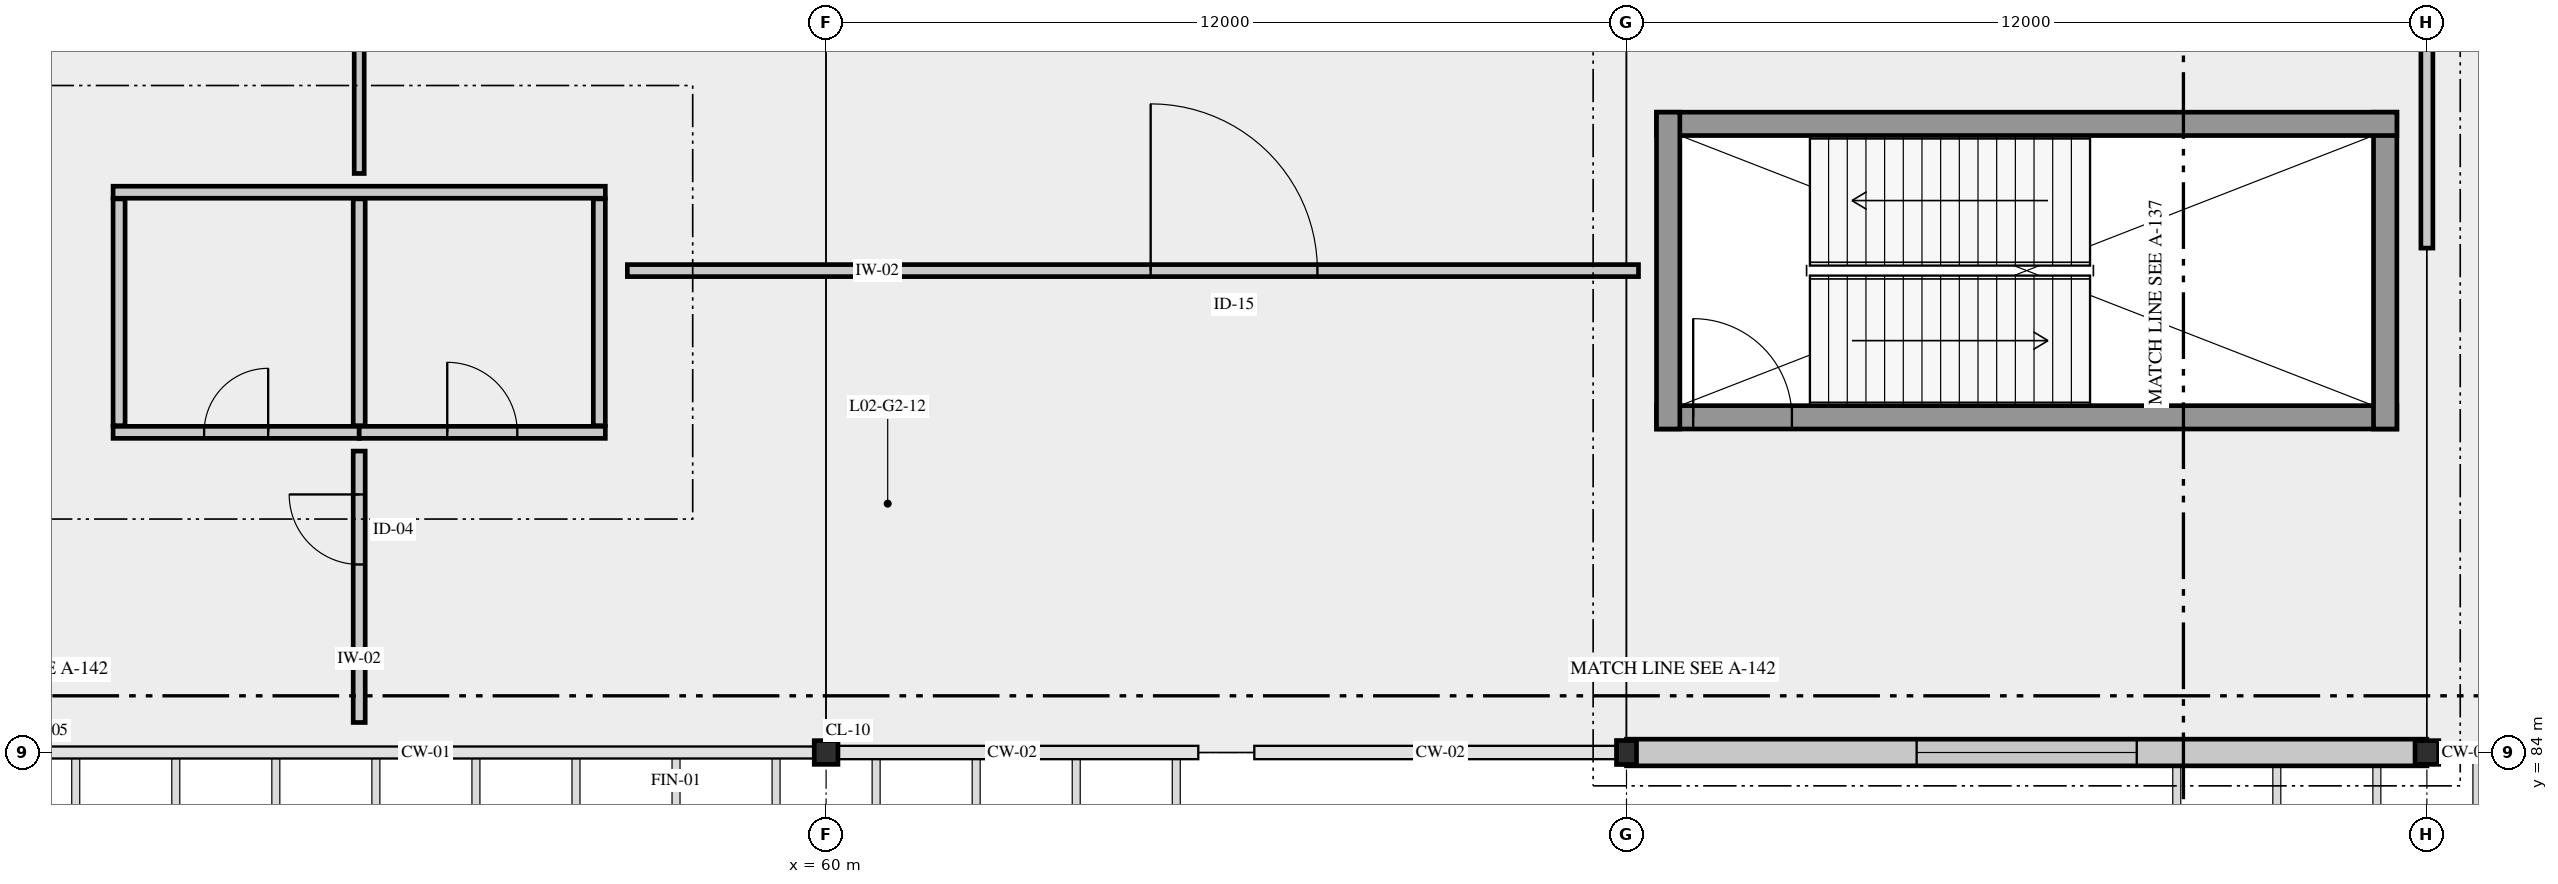
"""IFC4 building model, lengths in metres.
Left out: names, types, materials, properties, quantities, classifications, styles, units other than length and angle.
Written with IfcOpenShell. Run it as: python <this file> out.ifc"""

import sys

from ifc_helpers import new_model, si_unit, direction, frame, frame_2d, origin, origin_2d, place, context, subcontext, project, spatial, rectangle, hollow_circle, i_section, extrude, element, fill, save


model = new_model("IFC4")
c1 = context("Model", 3, precision=1e-05, world=origin(), true_north=direction((0.0, 1.0)))
c2 = subcontext(c1, "Body", "Model", "MODEL_VIEW")
j1 = project(units=[si_unit("LENGTHUNIT", "METRE"), si_unit("PLANEANGLEUNIT", "RADIAN")], contexts=[c1])
p1 = place(None, origin())
s1 = spatial("IfcSite", under=j1, at=p1, CompositionType="ELEMENT")
p2 = place(p1, origin())
s2 = spatial("IfcBuilding", under=s1, at=p2, CompositionType="ELEMENT")
p3 = place(p2, frame((0.0, 0.0, 10.8)))
s3 = spatial("IfcBuildingStorey", under=s2, at=p3, CompositionType="ELEMENT", Elevation=10.8)
p4 = place(p3, frame((60.0, 84.0, 0.0), z_axis=(0.0, 0.0, 1.0), x_axis=(1.0, 0.0, 0.0)))
e1 = element("IfcColumn", 1, at=p4, inside=s3, PredefinedType="COLUMN", context=c2, shape_type="SweptSolid", body=[
    extrude(hollow_circle(Radius=0.178, WallThickness=0.016, at=origin_2d()), origin(), (0.0, 0.0, 1.0), 6.0),
])
p5 = place(p3, frame((72.0, 84.0, 0.0), z_axis=(0.0, 0.0, 1.0), x_axis=(1.0, 0.0, 0.0)))
e2 = element("IfcColumn", 2, at=p5, inside=s3, PredefinedType="COLUMN", context=c2, shape_type="SweptSolid", body=[
    extrude(i_section(OverallWidth=0.3, OverallDepth=0.36, WebThickness=0.012, FlangeThickness=0.022, FilletRadius=0.027, at=origin_2d()), origin(), (0.0, 0.0, 1.0), 6.0),
])
p6 = place(p3, frame((84.0, 84.0, 0.0), z_axis=(0.0, 0.0, 1.0), x_axis=(1.0, 0.0, 0.0)))
e3 = element("IfcColumn", 3, at=p6, inside=s3, PredefinedType="COLUMN", context=c2, shape_type="SweptSolid", body=[
    extrude(hollow_circle(Radius=0.178, WallThickness=0.016, at=origin_2d()), origin(), (0.0, 0.0, 1.0), 6.0),
])
p7 = place(p3, frame((72.0, 84.0, 0.0), z_axis=(0.0, 0.0, 1.0), x_axis=(1.0, 0.0, 0.0)))
e4 = element("IfcWall", 4, at=p7, inside=s3, PredefinedType="SOLIDWALL", context=c2, shape_type="SweptSolid", body=[
    extrude(rectangle(XDim=12.0, YDim=0.4, at=frame_2d((6.0, 0.0))), origin(), (0.0, 0.0, 1.0), 5.11),
])
p8 = place(p7, frame((4.35, 0.0, 0.95)))
e5 = element("IfcOpeningElement", 5, at=p8, cuts=e4, PredefinedType="OPENING", context=c2, shape_type="SweptSolid", body=[
    extrude(rectangle(XDim=3.3, YDim=2.4, at=frame_2d((1.65, 1.2))), frame((0.0, 0.21, 0.0), z_axis=(0.0, -1.0, 0.0), x_axis=(1.0, 0.0, 0.0)), (0.0, 0.0, 1.0), 0.42),
])
p9 = place(p3, frame((72.45, 89.025, 0.0), z_axis=(0.0, 0.0, 1.0), x_axis=(1.0, 0.0, 0.0)))
e6 = element("IfcWall", 6, at=p9, inside=s3, PredefinedType="SHEAR", context=c2, shape_type="SweptSolid", body=[
    extrude(rectangle(XDim=11.1, YDim=0.35, at=frame_2d((5.55, 0.0))), origin(), (0.0, 0.0, 1.0), 5.69),
])
p10 = place(p9, frame((0.55, 0.0, 0.0)))
e7 = element("IfcOpeningElement", 7, at=p10, cuts=e6, PredefinedType="OPENING", context=c2, shape_type="SweptSolid", body=[
    extrude(rectangle(XDim=1.48, YDim=2.3, at=frame_2d((0.74, 1.15))), frame((0.0, 0.185, 0.0), z_axis=(0.0, -1.0, 0.0), x_axis=(1.0, 0.0, 0.0)), (0.0, 0.0, 1.0), 0.37),
])
p11 = place(p3, frame((83.375, 88.85, 0.0), z_axis=(0.0, 0.0, 1.0), x_axis=(0.0, 1.0, 0.0)))
e8 = element("IfcWall", 8, at=p11, inside=s3, PredefinedType="SHEAR", context=c2, shape_type="SweptSolid", body=[
    extrude(rectangle(XDim=4.75, YDim=0.35, at=frame_2d((2.375, 0.0))), origin(), (0.0, 0.0, 1.0), 5.69),
])
p12 = place(p3, frame((83.55, 93.425, 0.0), z_axis=(0.0, 0.0, 1.0), x_axis=(-1.0, 0.0, 0.0)))
e9 = element("IfcWall", 9, at=p12, inside=s3, PredefinedType="SHEAR", context=c2, shape_type="SweptSolid", body=[
    extrude(rectangle(XDim=11.1, YDim=0.35, at=frame_2d((5.55, 0.0))), origin(), (0.0, 0.0, 1.0), 5.69),
])
p13 = place(p3, frame((72.625, 93.6, 0.0), z_axis=(0.0, 0.0, 1.0), x_axis=(0.0, -1.0, 0.0)))
e10 = element("IfcWall", 10, at=p13, inside=s3, PredefinedType="SHEAR", context=c2, shape_type="SweptSolid", body=[
    extrude(rectangle(XDim=4.75, YDim=0.35, at=frame_2d((2.375, 0.0))), origin(), (0.0, 0.0, 1.0), 5.69),
])
p14 = place(p3, frame((49.31, 92.4, 0.0), z_axis=(0.0, 0.0, 1.0), x_axis=(1.0, 0.0, 0.0)))
e11 = element("IfcWall", 11, at=p14, inside=s3, PredefinedType="PARTITIONING", context=c2, shape_type="SweptSolid", body=[
    extrude(rectangle(XDim=7.38, YDim=0.18, at=frame_2d((3.69, 0.0))), origin(), (0.0, 0.0, 1.0), 5.27),
])
p15 = place(p3, frame((49.31, 88.8, 0.0), z_axis=(0.0, 0.0, 1.0), x_axis=(1.0, 0.0, 0.0)))
e12 = element("IfcWall", 12, at=p15, inside=s3, PredefinedType="PARTITIONING", context=c2, shape_type="SweptSolid", body=[
    extrude(rectangle(XDim=3.69, YDim=0.18, at=frame_2d((1.845, 0.0))), origin(), (0.0, 0.0, 1.0), 5.27),
])
p16 = place(p15, frame((1.365, 0.0, 0.0)))
e13 = element("IfcOpeningElement", 13, at=p16, cuts=e12, PredefinedType="OPENING", context=c2, shape_type="SweptSolid", body=[
    extrude(rectangle(XDim=0.96, YDim=2.15, at=frame_2d((0.48, 1.075))), frame((0.0, 0.1, 0.0), z_axis=(0.0, -1.0, 0.0), x_axis=(1.0, 0.0, 0.0)), (0.0, 0.0, 1.0), 0.2),
])
p17 = place(p3, frame((53.0, 88.8, 0.0), z_axis=(0.0, 0.0, 1.0), x_axis=(1.0, 0.0, 0.0)))
e14 = element("IfcWall", 14, at=p17, inside=s3, PredefinedType="PARTITIONING", context=c2, shape_type="SweptSolid", body=[
    extrude(rectangle(XDim=3.69, YDim=0.18, at=frame_2d((1.845, 0.0))), origin(), (0.0, 0.0, 1.0), 5.27),
])
p18 = place(p17, frame((1.32, 0.0, 0.0)))
e15 = element("IfcOpeningElement", 15, at=p18, cuts=e14, PredefinedType="OPENING", context=c2, shape_type="SweptSolid", body=[
    extrude(rectangle(XDim=1.05, YDim=2.2, at=frame_2d((0.525, 1.1))), frame((0.0, 0.1, 0.0), z_axis=(0.0, -1.0, 0.0), x_axis=(1.0, 0.0, 0.0)), (0.0, 0.0, 1.0), 0.2),
])
for number, where, z_axis, x_axis in (
    (16, (49.4, 88.9, 0.0), (0.0, 0.0, 1.0), (0.0, 1.0, 0.0)),
    (17, (56.6, 88.9, 0.0), (0.0, 0.0, 1.0), (0.0, 1.0, 0.0)),
    (18, (53.0, 88.9, 0.0), (0.0, 0.0, 1.0), (0.0, 1.0, 0.0)),
):
    element("IfcWall", number, at=place(p3, frame(where, z_axis=z_axis, x_axis=x_axis)), inside=s3, PredefinedType="PARTITIONING", context=c2, shape_type="SweptSolid", body=[
        extrude(rectangle(XDim=3.4, YDim=0.18, at=frame_2d((1.7, 0.0))), origin(), (0.0, 0.0, 1.0), 5.27),
    ])
p19 = place(p3, frame((53.0, 84.45, 0.0), z_axis=(0.0, 0.0, 1.0), x_axis=(0.0, 1.0, 0.0)))
e19 = element("IfcWall", 19, at=p19, inside=s3, PredefinedType="PARTITIONING", context=c2, shape_type="SweptSolid", body=[
    extrude(rectangle(XDim=4.069, YDim=0.18, at=frame_2d((2.035, 0.0))), origin(), (0.0, 0.0, 1.0), 5.27),
])
p20 = place(p19, frame((2.369, 0.0, 0.0)))
e20 = element("IfcOpeningElement", 20, at=p20, cuts=e19, PredefinedType="OPENING", context=c2, shape_type="SweptSolid", body=[
    extrude(rectangle(XDim=1.05, YDim=2.2, at=frame_2d((0.525, 1.1))), frame((0.0, 0.1, 0.0), z_axis=(0.0, -1.0, 0.0), x_axis=(1.0, 0.0, 0.0)), (0.0, 0.0, 1.0), 0.2),
])
p21 = place(p3, frame((53.0, 92.681, 0.0), z_axis=(0.0, 0.0, 1.0), x_axis=(0.0, 1.0, 0.0)))
e21 = element("IfcWall", 21, at=p21, inside=s3, PredefinedType="PARTITIONING", context=c2, shape_type="SweptSolid", body=[
    extrude(rectangle(XDim=26.869, YDim=0.15, at=frame_2d((13.435, 0.0))), origin(), (0.0, 0.0, 1.0), 5.18),
])
p22 = place(p21, frame((19.808, 0.0, 0.0)))
e22 = element("IfcOpeningElement", 22, at=p22, cuts=e21, PredefinedType="OPENING", context=c2, shape_type="SweptSolid", body=[
    extrude(rectangle(XDim=2.3, YDim=2.6, at=frame_2d((1.15, 1.3))), frame((0.0, 0.085, 0.0), z_axis=(0.0, -1.0, 0.0), x_axis=(1.0, 0.0, 0.0)), (0.0, 0.0, 1.0), 0.17),
])
p23 = place(p3, frame((57.02, 91.225, 0.0), z_axis=(0.0, 0.0, 1.0), x_axis=(1.0, 0.0, 0.0)))
e23 = element("IfcWall", 23, at=p23, inside=s3, PredefinedType="PARTITIONING", context=c2, shape_type="SweptSolid", body=[
    extrude(rectangle(XDim=15.16, YDim=0.18, at=frame_2d((7.58, 0.0))), origin(), (0.0, 0.0, 1.0), 5.18),
])
p24 = place(p23, frame((7.846, 0.0, 0.0)))
e24 = element("IfcOpeningElement", 24, at=p24, cuts=e23, PredefinedType="OPENING", context=c2, shape_type="SweptSolid", body=[
    extrude(rectangle(XDim=2.5, YDim=2.75, at=frame_2d((1.25, 1.375))), frame((0.0, 0.1, 0.0), z_axis=(0.0, -1.0, 0.0), x_axis=(1.0, 0.0, 0.0)), (0.0, 0.0, 1.0), 0.2),
])
p25 = place(p3, frame((84.0, 91.562, 0.0), z_axis=(0.0, 0.0, 1.0), x_axis=(0.0, 1.0, 0.0)))
e25 = element("IfcWall", 25, at=p25, inside=s3, PredefinedType="PARTITIONING", context=c2, shape_type="SweptSolid", body=[
    extrude(rectangle(XDim=27.843, YDim=0.18, at=frame_2d((13.921, 0.0))), origin(), (0.0, 0.0, 1.0), 5.18),
])
p26 = place(p25, frame((21.856, 0.0, 0.0)))
e26 = element("IfcOpeningElement", 26, at=p26, cuts=e25, PredefinedType="OPENING", context=c2, shape_type="SweptSolid", body=[
    extrude(rectangle(XDim=1.95, YDim=2.45, at=frame_2d((0.975, 1.225))), frame((0.0, 0.1, 0.0), z_axis=(0.0, -1.0, 0.0), x_axis=(1.0, 0.0, 0.0)), (0.0, 0.0, 1.0), 0.2),
])
p27 = place(p8, origin())
e27 = element("IfcWindow", 27, at=p27, inside=s3, PartitioningType="SINGLE_PANEL", PredefinedType="WINDOW", context=c2, shape_type="SweptSolid", body=[
    extrude(rectangle(XDim=3.3, YDim=2.4, at=frame_2d((1.65, 1.2))), frame((0.0, 0.03, 0.0), z_axis=(0.0, -1.0, 0.0), x_axis=(1.0, 0.0, 0.0)), (0.0, 0.0, 1.0), 0.06),
])
fill(e5, e27)
p28 = place(p10, origin())
e28 = element("IfcDoor", 28, at=p28, inside=s3, OperationType="DOUBLE_DOOR_SINGLE_SWING", PredefinedType="DOOR", context=c2, shape_type="SweptSolid", body=[
    extrude(rectangle(XDim=1.48, YDim=2.3, at=frame_2d((0.74, 1.15))), frame((0.0, 0.025, 0.0), z_axis=(0.0, -1.0, 0.0), x_axis=(1.0, 0.0, 0.0)), (0.0, 0.0, 1.0), 0.05),
])
fill(e7, e28)
p29 = place(p16, origin())
e29 = element("IfcDoor", 29, at=p29, inside=s3, OperationType="SINGLE_SWING_RIGHT", PredefinedType="DOOR", context=c2, shape_type="SweptSolid", body=[
    extrude(rectangle(XDim=0.96, YDim=2.15, at=frame_2d((0.48, 1.075))), frame((0.0, 0.025, 0.0), z_axis=(0.0, -1.0, 0.0), x_axis=(1.0, 0.0, 0.0)), (0.0, 0.0, 1.0), 0.05),
])
fill(e13, e29)
p30 = place(p18, origin())
e30 = element("IfcDoor", 30, at=p30, inside=s3, OperationType="SINGLE_SWING_LEFT", PredefinedType="DOOR", context=c2, shape_type="SweptSolid", body=[
    extrude(rectangle(XDim=1.05, YDim=2.2, at=frame_2d((0.525, 1.1))), frame((0.0, 0.025, 0.0), z_axis=(0.0, -1.0, 0.0), x_axis=(1.0, 0.0, 0.0)), (0.0, 0.0, 1.0), 0.05),
])
fill(e15, e30)
p31 = place(p20, origin())
e31 = element("IfcDoor", 31, at=p31, inside=s3, OperationType="SINGLE_SWING_RIGHT", PredefinedType="DOOR", context=c2, shape_type="SweptSolid", body=[
    extrude(rectangle(XDim=1.05, YDim=2.2, at=frame_2d((0.525, 1.1))), frame((0.0, 0.025, 0.0), z_axis=(0.0, -1.0, 0.0), x_axis=(1.0, 0.0, 0.0)), (0.0, 0.0, 1.0), 0.05),
])
fill(e20, e31)
p32 = place(p24, origin())
e32 = element("IfcDoor", 32, at=p32, inside=s3, OperationType="DOUBLE_DOOR_SINGLE_SWING", PredefinedType="DOOR", context=c2, shape_type="SweptSolid", body=[
    extrude(rectangle(XDim=2.5, YDim=2.75, at=frame_2d((1.25, 1.375))), frame((0.0, 0.025, 0.0), z_axis=(0.0, -1.0, 0.0), x_axis=(1.0, 0.0, 0.0)), (0.0, 0.0, 1.0), 0.05),
])
fill(e24, e32)
save(model, sys.argv[1])
